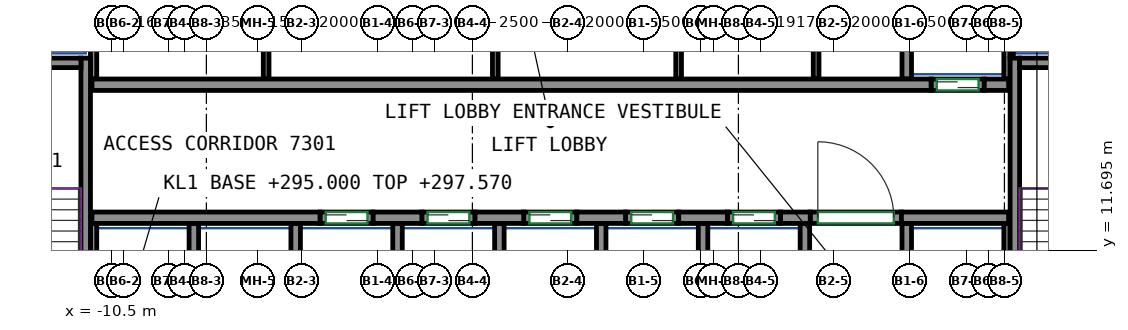
"""IFC4 building model, lengths in metres.
Left out: names, types, materials, properties, quantities, classifications, styles, units other than length and angle.
Written with IfcOpenShell. Run it as: python <this file> out.ifc"""

import sys

from ifc_helpers import new_model, si_unit, direction, frame, frame_2d, origin, place, context, subcontext, project, spatial, rectangle, extrude, source, transform, mapped, element, fill, save


model = new_model("IFC4")
c1 = context("Model", 3, precision=1e-05, world=origin(), true_north=direction((0.0, 1.0)))
c2 = subcontext(c1, "Body", "Model", "MODEL_VIEW")
j1 = project(units=[si_unit("LENGTHUNIT", "METRE"), si_unit("PLANEANGLEUNIT", "RADIAN")], contexts=[c1])
p1 = place(None, origin())
s1 = spatial("IfcSite", under=j1, at=p1, CompositionType="ELEMENT")
p2 = place(p1, origin())
s2 = spatial("IfcBuilding", under=s1, at=p2, CompositionType="ELEMENT")
p3 = place(p2, frame((0.0, 0.0, 295.0)))
s3 = spatial("IfcBuildingStorey", under=s2, at=p3, CompositionType="ELEMENT", Elevation=295.0)
m1 = source(origin(), c2, "Body", "SweptSolid", [
    extrude(rectangle(XDim=7.75, YDim=0.25, at=frame_2d((3.875, 0.0))), origin(), (0.0, 0.0, 1.0), 3.12),
])
p4 = place(p3, frame((-11.175, 9.0, 0.0), z_axis=(0.0, 0.0, 1.0), x_axis=(0.0, 1.0, 0.0)))
e1 = element("IfcWall", 1, at=p4, inside=s3, PredefinedType="SHEAR", context=c2, shape_type="MappedRepresentation", body=[
    mapped(m1, transform((0.0, 0.0, 0.0))),
])
m2 = source(origin(), c2, "Body", "SweptSolid", [
    extrude(rectangle(XDim=3.7, YDim=0.25, at=frame_2d((1.85, 0.0))), origin(), (0.0, 0.0, 1.0), 3.12),
])
p5 = place(p3, frame((-15.0, 16.625, 0.0), z_axis=(0.0, 0.0, 1.0), x_axis=(1.0, 0.0, 0.0)))
e2 = element("IfcWall", 2, at=p5, inside=s3, PredefinedType="SHEAR", context=c2, shape_type="MappedRepresentation", body=[
    mapped(m2, transform((0.0, 0.0, 0.0))),
])
p6 = place(p3, frame((13.275, 9.0, 0.0), z_axis=(0.0, 0.0, 1.0), x_axis=(0.0, 1.0, 0.0)))
e3 = element("IfcWall", 3, at=p6, inside=s3, PredefinedType="SHEAR", context=c2, shape_type="MappedRepresentation", body=[
    mapped(m1, transform((0.0, 0.0, 0.0))),
])
m3 = source(origin(), c2, "Body", "SweptSolid", [
    extrude(rectangle(XDim=3.7, YDim=0.25, at=frame_2d((1.85, 0.0))), origin(), (0.0, 0.0, 1.0), 3.12),
])
p7 = place(p3, frame((13.4, 16.625, 0.0), z_axis=(0.0, 0.0, 1.0), x_axis=(1.0, 0.0, 0.0)))
e4 = element("IfcWall", 4, at=p7, inside=s3, PredefinedType="SHEAR", context=c2, shape_type="MappedRepresentation", body=[
    mapped(m3, transform((0.0, 0.0, 0.0))),
])
m4 = source(origin(), c2, "Body", "SweptSolid", [
    extrude(rectangle(XDim=6.0, YDim=0.3, at=frame_2d((3.0, 0.0))), origin(), (0.0, 0.0, 1.0), 3.12),
])
p8 = place(p3, frame((-11.01, 12.55, 0.0), z_axis=(0.0, 0.0, 1.0), x_axis=(1.0, 0.0, 0.0)))
e5 = element("IfcWall", 5, at=p8, inside=s3, PredefinedType="SHEAR", context=c2, shape_type="MappedRepresentation", body=[
    mapped(m4, transform((0.0, 0.0, 0.0))),
])
m5 = source(origin(), c2, "Body", "SweptSolid", [
    extrude(rectangle(XDim=1.28, YDim=0.3, at=frame_2d((0.64, 0.0))), origin(), (0.0, 0.0, 1.0), 3.12),
])
for number, where, z_axis, x_axis in (
    (6, (-3.61, 12.55, 0.0), (0.0, 0.0, 1.0), (1.0, 0.0, 0.0)),
    (7, (-0.93, 12.55, 0.0), (0.0, 0.0, 1.0), (1.0, 0.0, 0.0)),
    (8, (1.75, 12.55, 0.0), (0.0, 0.0, 1.0), (1.0, 0.0, 0.0)),
    (9, (4.43, 12.55, 0.0), (0.0, 0.0, 1.0), (1.0, 0.0, 0.0)),
):
    element("IfcWall", number, at=place(p3, frame(where, z_axis=z_axis, x_axis=x_axis)), inside=s3, PredefinedType="SHEAR", context=c2, shape_type="MappedRepresentation", body=[
        mapped(m5, transform((0.0, 0.0, 0.0))),
    ])
m6 = source(origin(), c2, "Body", "SweptSolid", [
    extrude(rectangle(XDim=0.78, YDim=0.3, at=frame_2d((0.39, 0.0))), origin(), (0.0, 0.0, 1.0), 3.12),
])
p9 = place(p3, frame((7.11, 12.55, 0.0), z_axis=(0.0, 0.0, 1.0), x_axis=(1.0, 0.0, 0.0)))
e10 = element("IfcWall", 10, at=p9, inside=s3, PredefinedType="SHEAR", context=c2, shape_type="MappedRepresentation", body=[
    mapped(m6, transform((0.0, 0.0, 0.0))),
])
m7 = source(origin(), c2, "Body", "SweptSolid", [
    extrude(rectangle(XDim=2.82, YDim=0.3, at=frame_2d((1.41, 0.0))), origin(), (0.0, 0.0, 1.0), 3.12),
])
p10 = place(p3, frame((10.29, 12.55, 0.0), z_axis=(0.0, 0.0, 1.0), x_axis=(1.0, 0.0, 0.0)))
e11 = element("IfcWall", 11, at=p10, inside=s3, PredefinedType="SHEAR", context=c2, shape_type="MappedRepresentation", body=[
    mapped(m7, transform((0.0, 0.0, 0.0))),
])
m8 = source(origin(), c2, "Body", "SweptSolid", [
    extrude(rectangle(XDim=22.08, YDim=0.3, at=frame_2d((11.04, 0.0))), origin(), (0.0, 0.0, 1.0), 3.12),
])
p11 = place(p3, frame((-11.01, 16.05, 0.0), z_axis=(0.0, 0.0, 1.0), x_axis=(1.0, 0.0, 0.0)))
e12 = element("IfcWall", 12, at=p11, inside=s3, PredefinedType="SHEAR", context=c2, shape_type="MappedRepresentation", body=[
    mapped(m8, transform((0.0, 0.0, 0.0))),
])
m9 = source(origin(), c2, "Body", "SweptSolid", [
    extrude(rectangle(XDim=0.64, YDim=0.3, at=frame_2d((0.32, 0.0))), origin(), (0.0, 0.0, 1.0), 3.12),
])
p12 = place(p3, frame((12.47, 16.05, 0.0), z_axis=(0.0, 0.0, 1.0), x_axis=(1.0, 0.0, 0.0)))
e13 = element("IfcWall", 13, at=p12, inside=s3, PredefinedType="SHEAR", context=c2, shape_type="MappedRepresentation", body=[
    mapped(m9, transform((0.0, 0.0, 0.0))),
])
m10 = source(origin(), c2, "Body", "SweptSolid", [
    extrude(rectangle(XDim=1.4, YDim=0.3, at=frame_2d((0.7, 0.0))), origin(), (0.0, 0.0, 1.0), 3.12),
])
p13 = place(p3, frame((-5.01, 12.55, 0.0), z_axis=(0.0, 0.0, 1.0), x_axis=(1.0, 0.0, 0.0)))
e14 = element("IfcWall", 14, at=p13, inside=s3, PredefinedType="PARTITIONING", context=c2, shape_type="MappedRepresentation", body=[
    mapped(m10, transform((0.0, 0.0, 0.0))),
])
p14 = place(p13, frame((0.15, 0.0, 0.0)))
e15 = element("IfcOpeningElement", 15, at=p14, cuts=e14, PredefinedType="OPENING", context=c2, shape_type="SweptSolid", body=[
    extrude(rectangle(XDim=1.1, YDim=2.1, at=frame_2d((0.55, 1.05))), frame((0.0, 0.16, 0.0), z_axis=(0.0, -1.0, 0.0), x_axis=(1.0, 0.0, 0.0)), (0.0, 0.0, 1.0), 0.32),
])
m11 = source(origin(), c2, "Body", "SweptSolid", [
    extrude(rectangle(XDim=1.4, YDim=0.3, at=frame_2d((0.7, 0.0))), origin(), (0.0, 0.0, 1.0), 3.12),
])
p15 = place(p3, frame((-2.33, 12.55, 0.0), z_axis=(0.0, 0.0, 1.0), x_axis=(1.0, 0.0, 0.0)))
e16 = element("IfcWall", 16, at=p15, inside=s3, PredefinedType="PARTITIONING", context=c2, shape_type="MappedRepresentation", body=[
    mapped(m11, transform((0.0, 0.0, 0.0))),
])
p16 = place(p15, frame((0.15, 0.0, 0.0)))
e17 = element("IfcOpeningElement", 17, at=p16, cuts=e16, PredefinedType="OPENING", context=c2, shape_type="SweptSolid", body=[
    extrude(rectangle(XDim=1.1, YDim=2.1, at=frame_2d((0.55, 1.05))), frame((0.0, 0.16, 0.0), z_axis=(0.0, -1.0, 0.0), x_axis=(1.0, 0.0, 0.0)), (0.0, 0.0, 1.0), 0.32),
])
p17 = place(p3, frame((0.35, 12.55, 0.0), z_axis=(0.0, 0.0, 1.0), x_axis=(1.0, 0.0, 0.0)))
e18 = element("IfcWall", 18, at=p17, inside=s3, PredefinedType="PARTITIONING", context=c2, shape_type="MappedRepresentation", body=[
    mapped(m10, transform((0.0, 0.0, 0.0))),
])
p18 = place(p17, frame((0.15, 0.0, 0.0)))
e19 = element("IfcOpeningElement", 19, at=p18, cuts=e18, PredefinedType="OPENING", context=c2, shape_type="SweptSolid", body=[
    extrude(rectangle(XDim=1.1, YDim=2.1, at=frame_2d((0.55, 1.05))), frame((0.0, 0.16, 0.0), z_axis=(0.0, -1.0, 0.0), x_axis=(1.0, 0.0, 0.0)), (0.0, 0.0, 1.0), 0.32),
])
p19 = place(p3, frame((3.03, 12.55, 0.0), z_axis=(0.0, 0.0, 1.0), x_axis=(1.0, 0.0, 0.0)))
e20 = element("IfcWall", 20, at=p19, inside=s3, PredefinedType="PARTITIONING", context=c2, shape_type="MappedRepresentation", body=[
    mapped(m10, transform((0.0, 0.0, 0.0))),
])
p20 = place(p19, frame((0.15, 0.0, 0.0)))
e21 = element("IfcOpeningElement", 21, at=p20, cuts=e20, PredefinedType="OPENING", context=c2, shape_type="SweptSolid", body=[
    extrude(rectangle(XDim=1.1, YDim=2.1, at=frame_2d((0.55, 1.05))), frame((0.0, 0.16, 0.0), z_axis=(0.0, -1.0, 0.0), x_axis=(1.0, 0.0, 0.0)), (0.0, 0.0, 1.0), 0.32),
])
p21 = place(p3, frame((5.71, 12.55, 0.0), z_axis=(0.0, 0.0, 1.0), x_axis=(1.0, 0.0, 0.0)))
e22 = element("IfcWall", 22, at=p21, inside=s3, PredefinedType="PARTITIONING", context=c2, shape_type="MappedRepresentation", body=[
    mapped(m11, transform((0.0, 0.0, 0.0))),
])
p22 = place(p21, frame((0.15, 0.0, 0.0)))
e23 = element("IfcOpeningElement", 23, at=p22, cuts=e22, PredefinedType="OPENING", context=c2, shape_type="SweptSolid", body=[
    extrude(rectangle(XDim=1.1, YDim=2.1, at=frame_2d((0.55, 1.05))), frame((0.0, 0.16, 0.0), z_axis=(0.0, -1.0, 0.0), x_axis=(1.0, 0.0, 0.0)), (0.0, 0.0, 1.0), 0.32),
])
p23 = place(p3, frame((11.07, 16.05, 0.0), z_axis=(0.0, 0.0, 1.0), x_axis=(1.0, 0.0, 0.0)))
e24 = element("IfcWall", 24, at=p23, inside=s3, PredefinedType="PARTITIONING", context=c2, shape_type="MappedRepresentation", body=[
    mapped(m10, transform((0.0, 0.0, 0.0))),
])
p24 = place(p23, frame((0.15, 0.0, 0.0)))
e25 = element("IfcOpeningElement", 25, at=p24, cuts=e24, PredefinedType="OPENING", context=c2, shape_type="SweptSolid", body=[
    extrude(rectangle(XDim=1.1, YDim=2.1, at=frame_2d((0.55, 1.05))), frame((0.0, 0.16, 0.0), z_axis=(0.0, -1.0, 0.0), x_axis=(1.0, 0.0, 0.0)), (0.0, 0.0, 1.0), 0.32),
])
m12 = source(origin(), c2, "Body", "SweptSolid", [
    extrude(rectangle(XDim=2.4, YDim=0.3, at=frame_2d((1.2, 0.0))), origin(), (0.0, 0.0, 1.0), 3.12),
])
p25 = place(p3, frame((7.89, 12.55, 0.0), z_axis=(0.0, 0.0, 1.0), x_axis=(1.0, 0.0, 0.0)))
e26 = element("IfcWall", 26, at=p25, inside=s3, PredefinedType="PARTITIONING", context=c2, shape_type="MappedRepresentation", body=[
    mapped(m12, transform((0.0, 0.0, 0.0))),
])
p26 = place(p25, frame((0.2, 0.0, 0.0)))
e27 = element("IfcOpeningElement", 27, at=p26, cuts=e26, PredefinedType="OPENING", context=c2, shape_type="SweptSolid", body=[
    extrude(rectangle(XDim=2.0, YDim=2.1, at=frame_2d((1.0, 1.05))), frame((0.0, 0.16, 0.0), z_axis=(0.0, -1.0, 0.0), x_axis=(1.0, 0.0, 0.0)), (0.0, 0.0, 1.0), 0.32),
])
m13 = source(origin(), c2, "Body", "SweptSolid", [
    extrude(rectangle(XDim=3.275, YDim=0.165, at=frame_2d((1.638, 0.0))), origin(), (0.0, 0.0, 1.0), 3.12),
])
p27 = place(p3, frame((13.067, 16.2, 0.0), z_axis=(0.0, 0.0, 1.0), x_axis=(0.0, 1.0, 0.0)))
e28 = element("IfcWall", 28, at=p27, inside=s3, PredefinedType="PARTITIONING", context=c2, shape_type="MappedRepresentation", body=[
    mapped(m13, transform((0.0, 0.0, 0.0))),
])
m14 = source(origin(), c2, "Body", "SweptSolid", [
    extrude(rectangle(XDim=4.8, YDim=0.165, at=frame_2d((2.4, 0.0))), origin(), (0.0, 0.0, 1.0), 3.12),
])
p28 = place(p3, frame((-10.968, 16.2, 0.0), z_axis=(0.0, 0.0, 1.0), x_axis=(0.0, 1.0, 0.0)))
e29 = element("IfcWall", 29, at=p28, inside=s3, PredefinedType="PARTITIONING", context=c2, shape_type="MappedRepresentation", body=[
    mapped(m14, transform((0.0, 0.0, 0.0))),
])
m15 = source(origin(), c2, "Body", "SweptSolid", [
    extrude(rectangle(XDim=3.275, YDim=0.25, at=frame_2d((1.638, 0.0))), origin(), (0.0, 0.0, 1.0), 3.12),
])
p29 = place(p3, frame((10.43, 16.2, 0.0), z_axis=(0.0, 0.0, 1.0), x_axis=(0.0, 1.0, 0.0)))
e30 = element("IfcWall", 30, at=p29, inside=s3, PredefinedType="PARTITIONING", context=c2, shape_type="MappedRepresentation", body=[
    mapped(m15, transform((0.0, 0.0, 0.0))),
])
m16 = source(origin(), c2, "Body", "SweptSolid", [
    extrude(rectangle(XDim=2.725, YDim=0.085, at=frame_2d((1.363, 0.0))), origin(), (0.0, 0.0, 1.0), 3.12),
])
p30 = place(p3, frame((13.192, 16.75, 0.0), z_axis=(0.0, 0.0, 1.0), x_axis=(0.0, 1.0, 0.0)))
e31 = element("IfcWall", 31, at=p30, inside=s3, PredefinedType="PARTITIONING", context=c2, shape_type="MappedRepresentation", body=[
    mapped(m16, transform((0.0, 0.0, 0.0))),
])
m17 = source(origin(), c2, "Body", "SweptSolid", [
    extrude(rectangle(XDim=3.4, YDim=0.25, at=frame_2d((1.7, 0.0))), origin(), (0.0, 0.0, 1.0), 3.12),
])
p31 = place(p3, frame((10.43, 9.0, 0.0), z_axis=(0.0, 0.0, 1.0), x_axis=(0.0, 1.0, 0.0)))
e32 = element("IfcWall", 32, at=p31, inside=s3, PredefinedType="PARTITIONING", context=c2, shape_type="MappedRepresentation", body=[
    mapped(m17, transform((0.0, 0.0, 0.0))),
])
m18 = source(origin(), c2, "Body", "SweptSolid", [
    extrude(rectangle(XDim=3.4, YDim=0.165, at=frame_2d((1.7, 0.0))), origin(), (0.0, 0.0, 1.0), 3.12),
])
p32 = place(p3, frame((13.067, 9.0, 0.0), z_axis=(0.0, 0.0, 1.0), x_axis=(0.0, 1.0, 0.0)))
e33 = element("IfcWall", 33, at=p32, inside=s3, PredefinedType="PARTITIONING", context=c2, shape_type="MappedRepresentation", body=[
    mapped(m18, transform((0.0, 0.0, 0.0))),
])
for number, where, z_axis, x_axis in (
    (34, (2.39, 9.0, 0.0), (0.0, 0.0, 1.0), (0.0, 1.0, 0.0)),
    (35, (5.07, 9.0, 0.0), (0.0, 0.0, 1.0), (0.0, 1.0, 0.0)),
    (36, (7.75, 9.0, 0.0), (0.0, 0.0, 1.0), (0.0, 1.0, 0.0)),
    (37, (-0.29, 9.0, 0.0), (0.0, 0.0, 1.0), (0.0, 1.0, 0.0)),
):
    element("IfcWall", number, at=place(p3, frame(where, z_axis=z_axis, x_axis=x_axis)), inside=s3, PredefinedType="PARTITIONING", context=c2, shape_type="MappedRepresentation", body=[
        mapped(m17, transform((0.0, 0.0, 0.0))),
    ])
p33 = place(p3, frame((-10.968, 9.0, 0.0), z_axis=(0.0, 0.0, 1.0), x_axis=(0.0, 1.0, 0.0)))
e38 = element("IfcWall", 38, at=p33, inside=s3, PredefinedType="PARTITIONING", context=c2, shape_type="MappedRepresentation", body=[
    mapped(m18, transform((0.0, 0.0, 0.0))),
])
for number, where, z_axis, x_axis in (
    (39, (-2.97, 9.0, 0.0), (0.0, 0.0, 1.0), (0.0, 1.0, 0.0)),
    (40, (-5.65, 9.0, 0.0), (0.0, 0.0, 1.0), (0.0, 1.0, 0.0)),
    (41, (-8.33, 9.0, 0.0), (0.0, 0.0, 1.0), (0.0, 1.0, 0.0)),
):
    element("IfcWall", number, at=place(p3, frame(where, z_axis=z_axis, x_axis=x_axis)), inside=s3, PredefinedType="PARTITIONING", context=c2, shape_type="MappedRepresentation", body=[
        mapped(m17, transform((0.0, 0.0, 0.0))),
    ])
m19 = source(origin(), c2, "Body", "SweptSolid", [
    extrude(rectangle(XDim=4.8, YDim=0.15, at=frame_2d((2.4, 0.0))), origin(), (0.0, 0.0, 1.0), 3.12),
])
for number, where, z_axis, x_axis in (
    (42, (-6.427, 16.2, 0.0), (0.0, 0.0, 1.0), (0.0, 1.0, 0.0)),
    (43, (-0.397, 16.2, 0.0), (0.0, 0.0, 1.0), (0.0, 1.0, 0.0)),
    (44, (4.427, 16.2, 0.0), (0.0, 0.0, 1.0), (0.0, 1.0, 0.0)),
    (45, (8.045, 16.2, 0.0), (0.0, 0.0, 1.0), (0.0, 1.0, 0.0)),
):
    element("IfcWall", number, at=place(p3, frame(where, z_axis=z_axis, x_axis=x_axis)), inside=s3, PredefinedType="PARTITIONING", context=c2, shape_type="MappedRepresentation", body=[
        mapped(m19, transform((0.0, 0.0, 0.0))),
    ])
p34 = place(p26, origin())
e46 = element("IfcDoor", 46, at=p34, inside=s3, OperationType="DOUBLE_DOOR_SINGLE_SWING", PredefinedType="DOOR", context=c2, shape_type="SweptSolid", body=[
    extrude(rectangle(XDim=2.0, YDim=2.1, at=frame_2d((1.0, 1.05))), frame((0.0, 0.025, 0.0), z_axis=(0.0, -1.0, 0.0), x_axis=(1.0, 0.0, 0.0)), (0.0, 0.0, 1.0), 0.05),
])
fill(e27, e46)
p35 = place(p14, origin())
e47 = element("IfcDoor", 47, at=p35, inside=s3, OperationType="DOUBLE_DOOR_SLIDING", PredefinedType="DOOR", context=c2, shape_type="SweptSolid", body=[
    extrude(rectangle(XDim=1.1, YDim=2.1, at=frame_2d((0.55, 1.05))), frame((0.0, 0.025, 0.0), z_axis=(0.0, -1.0, 0.0), x_axis=(1.0, 0.0, 0.0)), (0.0, 0.0, 1.0), 0.05),
])
fill(e15, e47)
p36 = place(p16, origin())
e48 = element("IfcDoor", 48, at=p36, inside=s3, OperationType="DOUBLE_DOOR_SLIDING", PredefinedType="DOOR", context=c2, shape_type="SweptSolid", body=[
    extrude(rectangle(XDim=1.1, YDim=2.1, at=frame_2d((0.55, 1.05))), frame((0.0, 0.025, 0.0), z_axis=(0.0, -1.0, 0.0), x_axis=(1.0, 0.0, 0.0)), (0.0, 0.0, 1.0), 0.05),
])
fill(e17, e48)
p37 = place(p18, origin())
e49 = element("IfcDoor", 49, at=p37, inside=s3, OperationType="DOUBLE_DOOR_SLIDING", PredefinedType="DOOR", context=c2, shape_type="SweptSolid", body=[
    extrude(rectangle(XDim=1.1, YDim=2.1, at=frame_2d((0.55, 1.05))), frame((0.0, 0.025, 0.0), z_axis=(0.0, -1.0, 0.0), x_axis=(1.0, 0.0, 0.0)), (0.0, 0.0, 1.0), 0.05),
])
fill(e19, e49)
p38 = place(p20, origin())
e50 = element("IfcDoor", 50, at=p38, inside=s3, OperationType="DOUBLE_DOOR_SLIDING", PredefinedType="DOOR", context=c2, shape_type="SweptSolid", body=[
    extrude(rectangle(XDim=1.1, YDim=2.1, at=frame_2d((0.55, 1.05))), frame((0.0, 0.025, 0.0), z_axis=(0.0, -1.0, 0.0), x_axis=(1.0, 0.0, 0.0)), (0.0, 0.0, 1.0), 0.05),
])
fill(e21, e50)
p39 = place(p22, origin())
e51 = element("IfcDoor", 51, at=p39, inside=s3, OperationType="DOUBLE_DOOR_SLIDING", PredefinedType="DOOR", context=c2, shape_type="SweptSolid", body=[
    extrude(rectangle(XDim=1.1, YDim=2.1, at=frame_2d((0.55, 1.05))), frame((0.0, 0.025, 0.0), z_axis=(0.0, -1.0, 0.0), x_axis=(1.0, 0.0, 0.0)), (0.0, 0.0, 1.0), 0.05),
])
fill(e23, e51)
p40 = place(p24, origin())
e52 = element("IfcDoor", 52, at=p40, inside=s3, OperationType="DOUBLE_DOOR_SLIDING", PredefinedType="DOOR", context=c2, shape_type="SweptSolid", body=[
    extrude(rectangle(XDim=1.1, YDim=2.1, at=frame_2d((0.55, 1.05))), frame((0.0, 0.025, 0.0), z_axis=(0.0, -1.0, 0.0), x_axis=(1.0, 0.0, 0.0)), (0.0, 0.0, 1.0), 0.05),
])
fill(e25, e52)
save(model, sys.argv[1])
